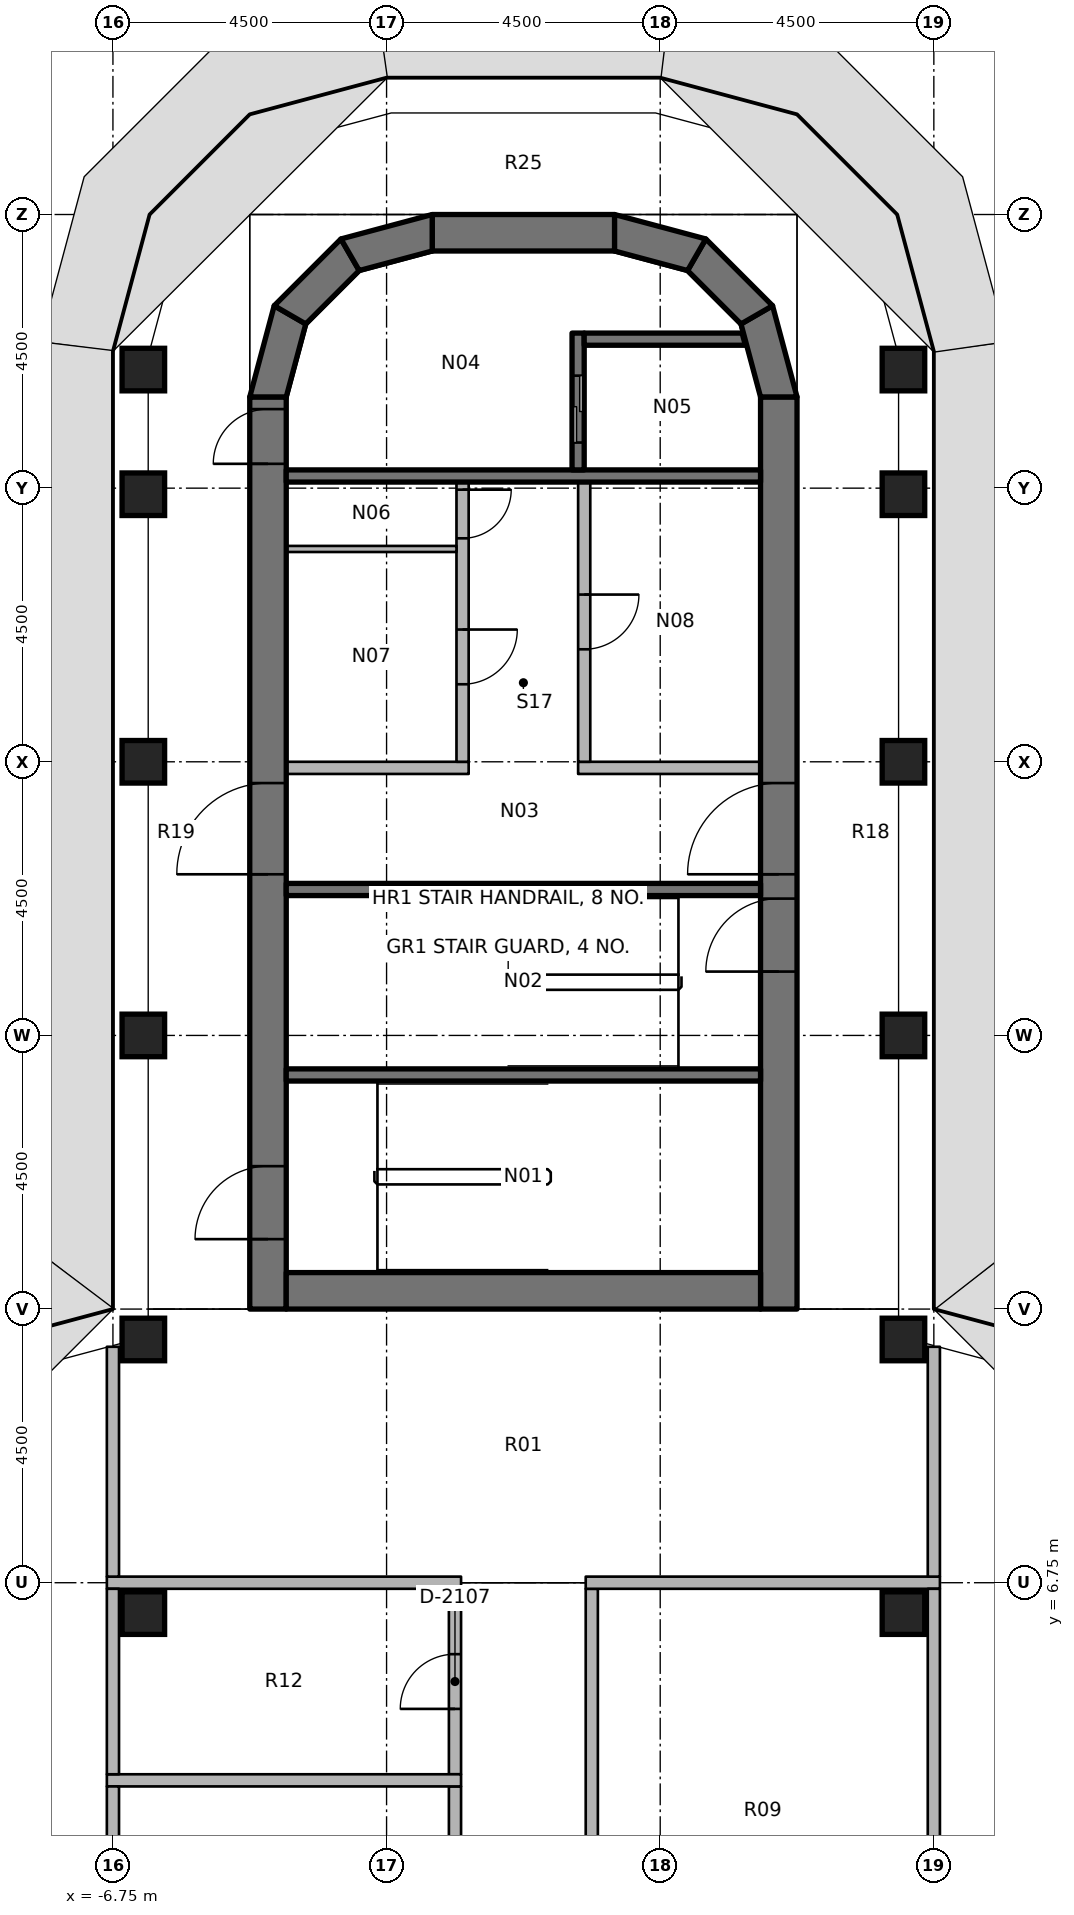
"""IFC4 building model, lengths in metres.
Left out: names, types, materials, properties, quantities, classifications, styles, units other than length and angle.
Written with IfcOpenShell. Run it as: python <this file> out.ifc"""

import sys

from ifc_helpers import new_model, si_unit, direction, frame, frame_2d, origin, origin_2d, place, context, subcontext, project, spatial, polyline, rectangle, outline, extrude, element, fill, save


model = new_model("IFC4")
c1 = context("Model", 3, precision=1e-05, world=origin(), true_north=direction((0.0, 1.0)))
c2 = subcontext(c1, "Body", "Model", "MODEL_VIEW")
j1 = project(units=[si_unit("LENGTHUNIT", "METRE"), si_unit("PLANEANGLEUNIT", "RADIAN")], contexts=[c1])
p1 = place(None, origin())
s1 = spatial("IfcSite", under=j1, at=p1, CompositionType="ELEMENT")
p2 = place(p1, origin())
s2 = spatial("IfcBuilding", under=s1, at=p2, CompositionType="ELEMENT")
p3 = place(p2, frame((0.0, 0.0, 195.4)))
s3 = spatial("IfcBuildingStorey", under=s2, at=p3, CompositionType="ELEMENT", Elevation=195.4)
for number, where, z_axis, x_axis in (
    (1, (-6.25, 6.25, 0.0), (0.0, 0.0, 1.0), (1.0, 0.0, 0.0)),
    (2, (-6.25, 10.75, 0.0), (0.0, 0.0, 1.0), (1.0, 0.0, 0.0)),
    (3, (-6.25, 15.75, 0.0), (0.0, 0.0, 1.0), (1.0, 0.0, 0.0)),
    (4, (-6.25, 20.25, 0.0), (0.0, 0.0, 1.0), (1.0, 0.0, 0.0)),
    (5, (-6.25, 24.65, 0.0), (0.0, 0.0, 1.0), (1.0, 0.0, 0.0)),
    (6, (-6.25, 26.7, 0.0), (0.0, 0.0, 1.0), (1.0, 0.0, 0.0)),
    (7, (6.25, 6.25, 0.0), (0.0, 0.0, 1.0), (1.0, 0.0, 0.0)),
    (8, (6.25, 10.75, 0.0), (0.0, 0.0, 1.0), (1.0, 0.0, 0.0)),
    (9, (6.25, 15.75, 0.0), (0.0, 0.0, 1.0), (1.0, 0.0, 0.0)),
    (10, (6.25, 20.25, 0.0), (0.0, 0.0, 1.0), (1.0, 0.0, 0.0)),
    (11, (6.25, 24.65, 0.0), (0.0, 0.0, 1.0), (1.0, 0.0, 0.0)),
    (12, (6.25, 26.7, 0.0), (0.0, 0.0, 1.0), (1.0, 0.0, 0.0)),
):
    element("IfcColumn", number, at=place(p3, frame(where, z_axis=z_axis, x_axis=x_axis)), inside=s3, PredefinedType="COLUMN", context=c2, shape_type="SweptSolid", body=[
        extrude(rectangle(XDim=0.7, YDim=0.7, at=origin_2d()), origin(), (0.0, 0.0, 1.0), 3.65),
    ])
p4 = place(p3, frame((-4.2, 11.25, 0.0), z_axis=(0.0, 0.0, 1.0), x_axis=(0.0, 1.0, 0.0)))
e13 = element("IfcWall", 13, at=p4, inside=s3, PredefinedType="SHEAR", context=c2, shape_type="SweptSolid", body=[
    extrude(rectangle(XDim=15.0, YDim=0.6, at=frame_2d((7.5, 0.0))), origin(), (0.0, 0.0, 1.0), 3.8),
])
p5 = place(p4, frame((7.15, 0.0, 0.0)))
e14 = element("IfcOpeningElement", 14, at=p5, cuts=e13, PredefinedType="OPENING", context=c2, shape_type="SweptSolid", body=[
    extrude(rectangle(XDim=1.5, YDim=2.3, at=frame_2d((0.75, 1.15))), frame((0.0, 0.31, 0.0), z_axis=(0.0, -1.0, 0.0), x_axis=(1.0, 0.0, 0.0)), (0.0, 0.0, 1.0), 0.62),
])
p6 = place(p4, frame((13.9, 0.0, 0.0)))
e15 = element("IfcOpeningElement", 15, at=p6, cuts=e13, PredefinedType="OPENING", context=c2, shape_type="SweptSolid", body=[
    extrude(rectangle(XDim=0.9, YDim=2.1, at=frame_2d((0.45, 1.05))), frame((0.0, 0.31, 0.0), z_axis=(0.0, -1.0, 0.0), x_axis=(1.0, 0.0, 0.0)), (0.0, 0.0, 1.0), 0.62),
])
p7 = place(p4, frame((1.15, 0.0, 0.0)))
e16 = element("IfcOpeningElement", 16, at=p7, cuts=e13, PredefinedType="OPENING", context=c2, shape_type="SweptSolid", body=[
    extrude(rectangle(XDim=1.2, YDim=2.1, at=frame_2d((0.6, 1.05))), frame((0.0, 0.31, 0.0), z_axis=(0.0, -1.0, 0.0), x_axis=(1.0, 0.0, 0.0)), (0.0, 0.0, 1.0), 0.62),
])
p8 = place(p3, frame((4.2, 11.25, 0.0), z_axis=(0.0, 0.0, 1.0), x_axis=(0.0, 1.0, 0.0)))
e17 = element("IfcWall", 17, at=p8, inside=s3, PredefinedType="SHEAR", context=c2, shape_type="SweptSolid", body=[
    extrude(rectangle(XDim=15.0, YDim=0.6, at=frame_2d((7.5, 0.0))), origin(), (0.0, 0.0, 1.0), 3.8),
])
p9 = place(p8, frame((7.15, 0.0, 0.0)))
e18 = element("IfcOpeningElement", 18, at=p9, cuts=e17, PredefinedType="OPENING", context=c2, shape_type="SweptSolid", body=[
    extrude(rectangle(XDim=1.5, YDim=2.3, at=frame_2d((0.75, 1.15))), frame((0.0, 0.31, 0.0), z_axis=(0.0, -1.0, 0.0), x_axis=(1.0, 0.0, 0.0)), (0.0, 0.0, 1.0), 0.62),
])
p10 = place(p8, frame((5.55, 0.0, 0.0)))
e19 = element("IfcOpeningElement", 19, at=p10, cuts=e17, PredefinedType="OPENING", context=c2, shape_type="SweptSolid", body=[
    extrude(rectangle(XDim=1.2, YDim=2.1, at=frame_2d((0.6, 1.05))), frame((0.0, 0.31, 0.0), z_axis=(0.0, -1.0, 0.0), x_axis=(1.0, 0.0, 0.0)), (0.0, 0.0, 1.0), 0.62),
])
p11 = place(p3, frame((-3.9, 11.55, 0.0), z_axis=(0.0, 0.0, 1.0), x_axis=(1.0, 0.0, 0.0)))
e20 = element("IfcWall", 20, at=p11, inside=s3, PredefinedType="SHEAR", context=c2, shape_type="SweptSolid", body=[
    extrude(rectangle(XDim=7.8, YDim=0.6, at=frame_2d((3.9, 0.0))), origin(), (0.0, 0.0, 1.0), 3.8),
])
p12 = place(p3, frame((-1.5, 28.95, 0.0), z_axis=(0.0, 0.0, 1.0), x_axis=(1.0, 0.0, 0.0)))
e21 = element("IfcWall", 21, at=p12, inside=s3, PredefinedType="SHEAR", context=c2, shape_type="SweptSolid", body=[
    extrude(rectangle(XDim=3.0, YDim=0.6, at=frame_2d((1.5, 0.0))), origin(), (0.0, 0.0, 1.0), 3.8),
])
p13 = place(p3, origin())
e22 = element("IfcWall", 22, at=p13, inside=s3, PredefinedType="SHEAR", context=c2, shape_type="SweptSolid", body=[
    extrude(outline(polyline([(-4.5, 26.25), (-4.098, 27.75), (-3.579, 27.45), (-3.9, 26.25), (-4.5, 26.25)])), origin(), (0.0, 0.0, 1.0), 3.8),
])
p14 = place(p3, origin())
e23 = element("IfcWall", 23, at=p14, inside=s3, PredefinedType="SHEAR", context=c2, shape_type="SweptSolid", body=[
    extrude(outline(polyline([(-4.098, 27.75), (-3.0, 28.848), (-2.7, 28.329), (-3.579, 27.45), (-4.098, 27.75)])), origin(), (0.0, 0.0, 1.0), 3.8),
])
p15 = place(p3, origin())
e24 = element("IfcWall", 24, at=p15, inside=s3, PredefinedType="SHEAR", context=c2, shape_type="SweptSolid", body=[
    extrude(outline(polyline([(-3.0, 28.848), (-1.5, 29.25), (-1.5, 28.65), (-2.7, 28.329), (-3.0, 28.848)])), origin(), (0.0, 0.0, 1.0), 3.8),
])
p16 = place(p3, origin())
e25 = element("IfcWall", 25, at=p16, inside=s3, PredefinedType="SHEAR", context=c2, shape_type="SweptSolid", body=[
    extrude(outline(polyline([(4.5, 26.25), (4.098, 27.75), (3.579, 27.45), (3.9, 26.25), (4.5, 26.25)])), origin(), (0.0, 0.0, 1.0), 3.8),
])
p17 = place(p3, origin())
e26 = element("IfcWall", 26, at=p17, inside=s3, PredefinedType="SHEAR", context=c2, shape_type="SweptSolid", body=[
    extrude(outline(polyline([(4.098, 27.75), (3.0, 28.848), (2.7, 28.329), (3.579, 27.45), (4.098, 27.75)])), origin(), (0.0, 0.0, 1.0), 3.8),
])
p18 = place(p3, origin())
e27 = element("IfcWall", 27, at=p18, inside=s3, PredefinedType="SHEAR", context=c2, shape_type="SweptSolid", body=[
    extrude(outline(polyline([(3.0, 28.848), (1.5, 29.25), (1.5, 28.65), (2.7, 28.329), (3.0, 28.848)])), origin(), (0.0, 0.0, 1.0), 3.8),
])
p19 = place(p3, frame((-3.9, 24.95, 0.0), z_axis=(0.0, 0.0, 1.0), x_axis=(1.0, 0.0, 0.0)))
e28 = element("IfcWall", 28, at=p19, inside=s3, PredefinedType="SHEAR", context=c2, shape_type="SweptSolid", body=[
    extrude(rectangle(XDim=7.8, YDim=0.2, at=frame_2d((3.9, 0.0))), origin(), (0.0, 0.0, 1.0), 3.65),
])
p20 = place(p3, frame((0.9, 27.3, 0.0), z_axis=(0.0, 0.0, 1.0), x_axis=(0.0, -1.0, 0.0)))
e29 = element("IfcWall", 29, at=p20, inside=s3, PredefinedType="SHEAR", context=c2, shape_type="SweptSolid", body=[
    extrude(rectangle(XDim=2.25, YDim=0.2, at=frame_2d((1.125, 0.0))), origin(), (0.0, 0.0, 1.0), 3.65),
])
p21 = place(p20, frame((0.7, 0.0, 0.0)))
e30 = element("IfcOpeningElement", 30, at=p21, cuts=e29, PredefinedType="OPENING", context=c2, shape_type="SweptSolid", body=[
    extrude(rectangle(XDim=1.1, YDim=2.3, at=frame_2d((0.55, 1.15))), frame((0.0, 0.11, 0.0), z_axis=(0.0, -1.0, 0.0), x_axis=(1.0, 0.0, 0.0)), (0.0, 0.0, 1.0), 0.22),
])
p22 = place(p3, origin())
e31 = element("IfcWall", 31, at=p22, inside=s3, PredefinedType="SHEAR", context=c2, shape_type="SweptSolid", body=[
    extrude(outline(polyline([(1.0, 27.1), (3.651, 27.1), (3.597, 27.3), (1.0, 27.3), (1.0, 27.1)])), origin(), (0.0, 0.0, 1.0), 3.65),
])
for number, where, z_axis, x_axis in (
    (32, (-3.9, 18.15, 0.0), (0.0, 0.0, 1.0), (1.0, 0.0, 0.0)),
    (33, (-3.9, 15.1, 0.0), (0.0, 0.0, 1.0), (1.0, 0.0, 0.0)),
):
    element("IfcWall", number, at=place(p3, frame(where, z_axis=z_axis, x_axis=x_axis)), inside=s3, PredefinedType="SHEAR", context=c2, shape_type="SweptSolid", body=[
        extrude(rectangle(XDim=7.8, YDim=0.2, at=frame_2d((3.9, 0.0))), origin(), (0.0, 0.0, 1.0), 3.65),
    ])
p23 = place(p3, frame((-3.9, 20.15, 0.0), z_axis=(0.0, 0.0, 1.0), x_axis=(1.0, 0.0, 0.0)))
e34 = element("IfcWall", 34, at=p23, inside=s3, PredefinedType="PARTITIONING", context=c2, shape_type="SweptSolid", body=[
    extrude(rectangle(XDim=3.0, YDim=0.2, at=frame_2d((1.5, 0.0))), origin(), (0.0, 0.0, 1.0), 3.65),
])
p24 = place(p3, frame((-1.0, 24.85, 0.0), z_axis=(0.0, 0.0, 1.0), x_axis=(0.0, -1.0, 0.0)))
e35 = element("IfcWall", 35, at=p24, inside=s3, PredefinedType="PARTITIONING", context=c2, shape_type="SweptSolid", body=[
    extrude(rectangle(XDim=4.6, YDim=0.2, at=frame_2d((2.3, 0.0))), origin(), (0.0, 0.0, 1.0), 3.65),
])
p25 = place(p24, frame((0.125, 0.0, 0.0)))
e36 = element("IfcOpeningElement", 36, at=p25, cuts=e35, PredefinedType="OPENING", context=c2, shape_type="SweptSolid", body=[
    extrude(rectangle(XDim=0.8, YDim=2.1, at=frame_2d((0.4, 1.05))), frame((0.0, 0.11, 0.0), z_axis=(0.0, -1.0, 0.0), x_axis=(1.0, 0.0, 0.0)), (0.0, 0.0, 1.0), 0.22),
])
p26 = place(p24, frame((2.425, 0.0, 0.0)))
e37 = element("IfcOpeningElement", 37, at=p26, cuts=e35, PredefinedType="OPENING", context=c2, shape_type="SweptSolid", body=[
    extrude(rectangle(XDim=0.9, YDim=2.1, at=frame_2d((0.45, 1.05))), frame((0.0, 0.11, 0.0), z_axis=(0.0, -1.0, 0.0), x_axis=(1.0, 0.0, 0.0)), (0.0, 0.0, 1.0), 0.22),
])
p27 = place(p3, frame((0.9, 20.15, 0.0), z_axis=(0.0, 0.0, 1.0), x_axis=(1.0, 0.0, 0.0)))
e38 = element("IfcWall", 38, at=p27, inside=s3, PredefinedType="PARTITIONING", context=c2, shape_type="SweptSolid", body=[
    extrude(rectangle(XDim=3.0, YDim=0.2, at=frame_2d((1.5, 0.0))), origin(), (0.0, 0.0, 1.0), 3.65),
])
p28 = place(p3, frame((1.0, 24.85, 0.0), z_axis=(0.0, 0.0, 1.0), x_axis=(0.0, -1.0, 0.0)))
e39 = element("IfcWall", 39, at=p28, inside=s3, PredefinedType="PARTITIONING", context=c2, shape_type="SweptSolid", body=[
    extrude(rectangle(XDim=4.6, YDim=0.2, at=frame_2d((2.3, 0.0))), origin(), (0.0, 0.0, 1.0), 3.65),
])
p29 = place(p28, frame((1.85, 0.0, 0.0)))
e40 = element("IfcOpeningElement", 40, at=p29, cuts=e39, PredefinedType="OPENING", context=c2, shape_type="SweptSolid", body=[
    extrude(rectangle(XDim=0.9, YDim=2.1, at=frame_2d((0.45, 1.05))), frame((0.0, 0.11, 0.0), z_axis=(0.0, -1.0, 0.0), x_axis=(1.0, 0.0, 0.0)), (0.0, 0.0, 1.0), 0.22),
])
p30 = place(p3, frame((-3.9, 23.75, 0.0), z_axis=(0.0, 0.0, 1.0), x_axis=(1.0, 0.0, 0.0)))
e41 = element("IfcWall", 41, at=p30, inside=s3, PredefinedType="PARTITIONING", context=c2, shape_type="SweptSolid", body=[
    extrude(rectangle(XDim=2.8, YDim=0.1, at=frame_2d((1.4, 0.0))), origin(), (0.0, 0.0, 1.0), 3.65),
])
p31 = place(p3, frame((1.125, 0.1, 0.0), z_axis=(0.0, 0.0, 1.0), x_axis=(0.0, 1.0, 0.0)))
e42 = element("IfcWall", 42, at=p31, inside=s3, PredefinedType="PARTITIONING", context=c2, shape_type="SweptSolid", body=[
    extrude(rectangle(XDim=6.55, YDim=0.2, at=frame_2d((3.275, 0.0))), origin(), (0.0, 0.0, 1.0), 2.75),
])
p32 = place(p3, frame((-1.125, 0.1, 0.0), z_axis=(0.0, 0.0, 1.0), x_axis=(0.0, 1.0, 0.0)))
e43 = element("IfcWall", 43, at=p32, inside=s3, PredefinedType="PARTITIONING", context=c2, shape_type="SweptSolid", body=[
    extrude(rectangle(XDim=3.3, YDim=0.2, at=frame_2d((1.65, 0.0))), origin(), (0.0, 0.0, 1.0), 2.75),
])
p33 = place(p3, frame((-1.125, 3.6, 0.0), z_axis=(0.0, 0.0, 1.0), x_axis=(0.0, 1.0, 0.0)))
e44 = element("IfcWall", 44, at=p33, inside=s3, PredefinedType="PARTITIONING", context=c2, shape_type="SweptSolid", body=[
    extrude(rectangle(XDim=3.05, YDim=0.2, at=frame_2d((1.525, 0.0))), origin(), (0.0, 0.0, 1.0), 2.75),
])
p34 = place(p33, frame((1.075, 0.0, 0.0)))
e45 = element("IfcOpeningElement", 45, at=p34, cuts=e44, PredefinedType="OPENING", context=c2, shape_type="SweptSolid", body=[
    extrude(rectangle(XDim=0.9, YDim=2.1, at=frame_2d((0.45, 1.05))), frame((0.0, 0.11, 0.0), z_axis=(0.0, -1.0, 0.0), x_axis=(1.0, 0.0, 0.0)), (0.0, 0.0, 1.0), 0.22),
])
p35 = place(p3, frame((1.025, 6.75, 0.0), z_axis=(0.0, 0.0, 1.0), x_axis=(1.0, 0.0, 0.0)))
e46 = element("IfcWall", 46, at=p35, inside=s3, PredefinedType="PARTITIONING", context=c2, shape_type="SweptSolid", body=[
    extrude(rectangle(XDim=5.825, YDim=0.2, at=frame_2d((2.913, 0.0))), origin(), (0.0, 0.0, 1.0), 2.75),
])
p36 = place(p3, frame((6.75, 6.85, 0.0), z_axis=(0.0, 0.0, 1.0), x_axis=(0.0, 1.0, 0.0)))
e47 = element("IfcWall", 47, at=p36, inside=s3, PredefinedType="PARTITIONING", context=c2, shape_type="SweptSolid", body=[
    extrude(rectangle(XDim=3.78, YDim=0.2, at=frame_2d((1.89, 0.0))), origin(), (0.0, 0.0, 1.0), 2.75),
])
p37 = place(p3, frame((-6.85, 6.75, 0.0), z_axis=(0.0, 0.0, 1.0), x_axis=(1.0, 0.0, 0.0)))
e48 = element("IfcWall", 48, at=p37, inside=s3, PredefinedType="PARTITIONING", context=c2, shape_type="SweptSolid", body=[
    extrude(rectangle(XDim=5.825, YDim=0.2, at=frame_2d((2.913, 0.0))), origin(), (0.0, 0.0, 1.0), 2.75),
])
p38 = place(p3, frame((-6.75, 6.85, 0.0), z_axis=(0.0, 0.0, 1.0), x_axis=(0.0, 1.0, 0.0)))
e49 = element("IfcWall", 49, at=p38, inside=s3, PredefinedType="PARTITIONING", context=c2, shape_type="SweptSolid", body=[
    extrude(rectangle(XDim=3.78, YDim=0.2, at=frame_2d((1.89, 0.0))), origin(), (0.0, 0.0, 1.0), 2.75),
])
p39 = place(p3, frame((6.75, 0.1, 0.0), z_axis=(0.0, 0.0, 1.0), x_axis=(0.0, 1.0, 0.0)))
e50 = element("IfcWall", 50, at=p39, inside=s3, PredefinedType="PARTITIONING", context=c2, shape_type="SweptSolid", body=[
    extrude(rectangle(XDim=6.55, YDim=0.2, at=frame_2d((3.275, 0.0))), origin(), (0.0, 0.0, 1.0), 2.75),
])
p40 = place(p3, frame((-6.85, 3.5, 0.0), z_axis=(0.0, 0.0, 1.0), x_axis=(1.0, 0.0, 0.0)))
e51 = element("IfcWall", 51, at=p40, inside=s3, PredefinedType="PARTITIONING", context=c2, shape_type="SweptSolid", body=[
    extrude(rectangle(XDim=5.825, YDim=0.2, at=frame_2d((2.913, 0.0))), origin(), (0.0, 0.0, 1.0), 2.75),
])
p41 = place(p3, frame((-6.75, 0.1, 0.0), z_axis=(0.0, 0.0, 1.0), x_axis=(0.0, 1.0, 0.0)))
e52 = element("IfcWall", 52, at=p41, inside=s3, PredefinedType="PARTITIONING", context=c2, shape_type="SweptSolid", body=[
    extrude(rectangle(XDim=3.3, YDim=0.2, at=frame_2d((1.65, 0.0))), origin(), (0.0, 0.0, 1.0), 2.75),
])
p42 = place(p3, frame((-6.75, 3.6, 0.0), z_axis=(0.0, 0.0, 1.0), x_axis=(0.0, 1.0, 0.0)))
e53 = element("IfcWall", 53, at=p42, inside=s3, PredefinedType="PARTITIONING", context=c2, shape_type="SweptSolid", body=[
    extrude(rectangle(XDim=3.05, YDim=0.2, at=frame_2d((1.525, 0.0))), origin(), (0.0, 0.0, 1.0), 2.75),
])
p43 = place(p5, origin())
e54 = element("IfcDoor", 54, at=p43, inside=s3, OperationType="DOUBLE_DOOR_SINGLE_SWING", PredefinedType="DOOR", context=c2, shape_type="SweptSolid", body=[
    extrude(rectangle(XDim=1.5, YDim=2.3, at=frame_2d((0.75, 1.15))), frame((0.0, 0.025, 0.0), z_axis=(0.0, -1.0, 0.0), x_axis=(1.0, 0.0, 0.0)), (0.0, 0.0, 1.0), 0.05),
])
fill(e14, e54)
p44 = place(p9, origin())
e55 = element("IfcDoor", 55, at=p44, inside=s3, OperationType="DOUBLE_DOOR_SINGLE_SWING", PredefinedType="DOOR", context=c2, shape_type="SweptSolid", body=[
    extrude(rectangle(XDim=1.5, YDim=2.3, at=frame_2d((0.75, 1.15))), frame((0.0, 0.025, 0.0), z_axis=(0.0, -1.0, 0.0), x_axis=(1.0, 0.0, 0.0)), (0.0, 0.0, 1.0), 0.05),
])
fill(e18, e55)
p45 = place(p6, origin())
e56 = element("IfcDoor", 56, at=p45, inside=s3, OperationType="SINGLE_SWING_RIGHT", PredefinedType="DOOR", context=c2, shape_type="SweptSolid", body=[
    extrude(rectangle(XDim=0.9, YDim=2.1, at=frame_2d((0.45, 1.05))), frame((0.0, 0.025, 0.0), z_axis=(0.0, -1.0, 0.0), x_axis=(1.0, 0.0, 0.0)), (0.0, 0.0, 1.0), 0.05),
])
fill(e15, e56)
p46 = place(p10, origin())
e57 = element("IfcDoor", 57, at=p46, inside=s3, OperationType="SINGLE_SWING_RIGHT", PredefinedType="DOOR", context=c2, shape_type="SweptSolid", body=[
    extrude(rectangle(XDim=1.2, YDim=2.1, at=frame_2d((0.6, 1.05))), frame((0.0, 0.025, 0.0), z_axis=(0.0, -1.0, 0.0), x_axis=(1.0, 0.0, 0.0)), (0.0, 0.0, 1.0), 0.05),
])
fill(e19, e57)
p47 = place(p7, origin())
e58 = element("IfcDoor", 58, at=p47, inside=s3, OperationType="SINGLE_SWING_LEFT", PredefinedType="DOOR", context=c2, shape_type="SweptSolid", body=[
    extrude(rectangle(XDim=1.2, YDim=2.1, at=frame_2d((0.6, 1.05))), frame((0.0, 0.025, 0.0), z_axis=(0.0, -1.0, 0.0), x_axis=(1.0, 0.0, 0.0)), (0.0, 0.0, 1.0), 0.05),
])
fill(e16, e58)
p48 = place(p21, origin())
e59 = element("IfcDoor", 59, at=p48, inside=s3, OperationType="DOUBLE_DOOR_SLIDING", PredefinedType="DOOR", context=c2, shape_type="SweptSolid", body=[
    extrude(rectangle(XDim=1.1, YDim=2.3, at=frame_2d((0.55, 1.15))), frame((0.0, 0.025, 0.0), z_axis=(0.0, -1.0, 0.0), x_axis=(1.0, 0.0, 0.0)), (0.0, 0.0, 1.0), 0.05),
])
fill(e30, e59)
p49 = place(p25, origin())
e60 = element("IfcDoor", 60, at=p49, inside=s3, OperationType="SINGLE_SWING_RIGHT", PredefinedType="DOOR", context=c2, shape_type="SweptSolid", body=[
    extrude(rectangle(XDim=0.8, YDim=2.1, at=frame_2d((0.4, 1.05))), frame((0.0, 0.025, 0.0), z_axis=(0.0, -1.0, 0.0), x_axis=(1.0, 0.0, 0.0)), (0.0, 0.0, 1.0), 0.05),
])
fill(e36, e60)
p50 = place(p26, origin())
e61 = element("IfcDoor", 61, at=p50, inside=s3, OperationType="SINGLE_SWING_RIGHT", PredefinedType="DOOR", context=c2, shape_type="SweptSolid", body=[
    extrude(rectangle(XDim=0.9, YDim=2.1, at=frame_2d((0.45, 1.05))), frame((0.0, 0.025, 0.0), z_axis=(0.0, -1.0, 0.0), x_axis=(1.0, 0.0, 0.0)), (0.0, 0.0, 1.0), 0.05),
])
fill(e37, e61)
p51 = place(p29, origin())
e62 = element("IfcDoor", 62, at=p51, inside=s3, OperationType="SINGLE_SWING_RIGHT", PredefinedType="DOOR", context=c2, shape_type="SweptSolid", body=[
    extrude(rectangle(XDim=0.9, YDim=2.1, at=frame_2d((0.45, 1.05))), frame((0.0, 0.025, 0.0), z_axis=(0.0, -1.0, 0.0), x_axis=(1.0, 0.0, 0.0)), (0.0, 0.0, 1.0), 0.05),
])
fill(e40, e62)
p52 = place(p34, origin())
e63 = element("IfcDoor", 63, at=p52, inside=s3, OperationType="SINGLE_SWING_LEFT", PredefinedType="DOOR", context=c2, shape_type="SweptSolid", body=[
    extrude(rectangle(XDim=0.9, YDim=2.1, at=frame_2d((0.45, 1.05))), frame((0.0, 0.025, 0.0), z_axis=(0.0, -1.0, 0.0), x_axis=(1.0, 0.0, 0.0)), (0.0, 0.0, 1.0), 0.05),
])
fill(e45, e63)
save(model, sys.argv[1])
